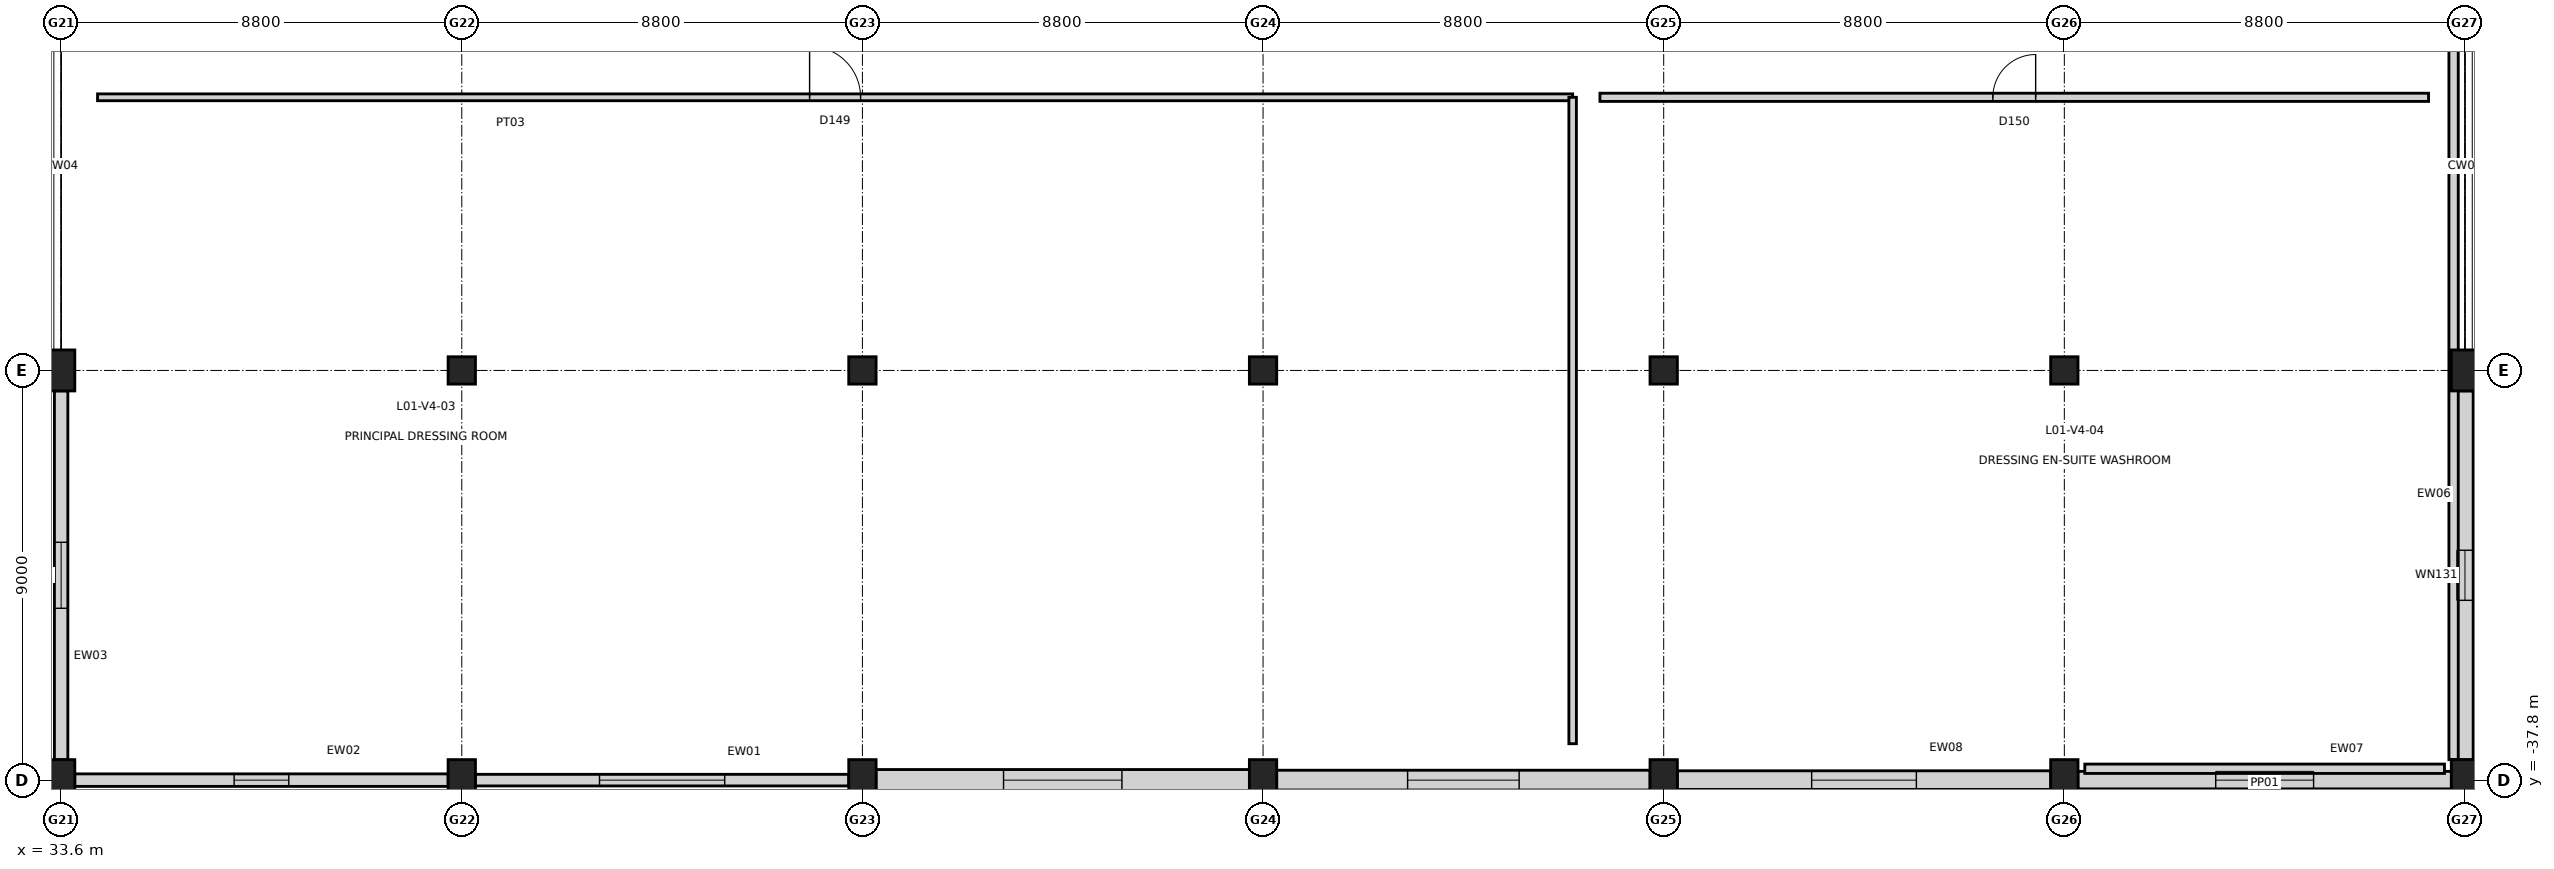
"""IFC4 building model, lengths in metres.
Left out: names, types, materials, properties, quantities, classifications, styles, units other than length and angle.
Written with IfcOpenShell. Run it as: python <this file> out.ifc"""

import sys

from ifc_helpers import new_model, si_unit, direction, frame, frame_2d, origin, origin_2d, place, context, subcontext, project, spatial, rectangle, extrude, element, fill, save


model = new_model("IFC4")
c1 = context("Model", 3, precision=1e-05, world=origin(), true_north=direction((0.0, 1.0)))
c2 = subcontext(c1, "Body", "Model", "MODEL_VIEW")
j1 = project(units=[si_unit("LENGTHUNIT", "METRE"), si_unit("PLANEANGLEUNIT", "RADIAN")], contexts=[c1])
p1 = place(None, origin())
s1 = spatial("IfcSite", under=j1, at=p1, CompositionType="ELEMENT")
p2 = place(p1, origin())
s2 = spatial("IfcBuilding", under=s1, at=p2, CompositionType="ELEMENT")
p3 = place(p2, frame((0.0, 0.0, 5.4)))
s3 = spatial("IfcBuildingStorey", under=s2, at=p3, CompositionType="ELEMENT", Elevation=5.4)
for number, where, z_axis, x_axis in (
    (1, (33.6, -37.8, 0.0), (0.0, 0.0, 1.0), (1.0, 0.0, 0.0)),
    (2, (33.6, -28.8, 0.0), (0.0, 0.0, 1.0), (1.0, 0.0, 0.0)),
    (3, (42.4, -37.8, 0.0), (0.0, 0.0, 1.0), (1.0, 0.0, 0.0)),
):
    element("IfcColumn", number, at=place(p3, frame(where, z_axis=z_axis, x_axis=x_axis)), inside=s3, PredefinedType="COLUMN", context=c2, shape_type="SweptSolid", body=[
        extrude(rectangle(XDim=0.6, YDim=0.9, at=origin_2d()), origin(), (0.0, 0.0, 1.0), 4.8),
    ])
p4 = place(p3, frame((42.4, -28.8, 0.0), z_axis=(0.0, 0.0, 1.0), x_axis=(1.0, 0.0, 0.0)))
e4 = element("IfcColumn", 4, at=p4, inside=s3, PredefinedType="COLUMN", context=c2, shape_type="SweptSolid", body=[
    extrude(rectangle(XDim=0.6, YDim=0.6, at=origin_2d()), origin(), (0.0, 0.0, 1.0), 4.8),
])
p5 = place(p3, frame((51.2, -37.8, 0.0), z_axis=(0.0, 0.0, 1.0), x_axis=(1.0, 0.0, 0.0)))
e5 = element("IfcColumn", 5, at=p5, inside=s3, PredefinedType="COLUMN", context=c2, shape_type="SweptSolid", body=[
    extrude(rectangle(XDim=0.6, YDim=0.9, at=origin_2d()), origin(), (0.0, 0.0, 1.0), 4.8),
])
p6 = place(p3, frame((51.2, -28.8, 0.0), z_axis=(0.0, 0.0, 1.0), x_axis=(1.0, 0.0, 0.0)))
e6 = element("IfcColumn", 6, at=p6, inside=s3, PredefinedType="COLUMN", context=c2, shape_type="SweptSolid", body=[
    extrude(rectangle(XDim=0.6, YDim=0.6, at=origin_2d()), origin(), (0.0, 0.0, 1.0), 4.8),
])
p7 = place(p3, frame((60.0, -37.8, 0.0), z_axis=(0.0, 0.0, 1.0), x_axis=(1.0, 0.0, 0.0)))
e7 = element("IfcColumn", 7, at=p7, inside=s3, PredefinedType="COLUMN", context=c2, shape_type="SweptSolid", body=[
    extrude(rectangle(XDim=0.6, YDim=0.9, at=origin_2d()), origin(), (0.0, 0.0, 1.0), 4.8),
])
p8 = place(p3, frame((60.0, -28.8, 0.0), z_axis=(0.0, 0.0, 1.0), x_axis=(1.0, 0.0, 0.0)))
e8 = element("IfcColumn", 8, at=p8, inside=s3, PredefinedType="COLUMN", context=c2, shape_type="SweptSolid", body=[
    extrude(rectangle(XDim=0.6, YDim=0.6, at=origin_2d()), origin(), (0.0, 0.0, 1.0), 4.8),
])
p9 = place(p3, frame((68.8, -37.8, 0.0), z_axis=(0.0, 0.0, 1.0), x_axis=(1.0, 0.0, 0.0)))
e9 = element("IfcColumn", 9, at=p9, inside=s3, PredefinedType="COLUMN", context=c2, shape_type="SweptSolid", body=[
    extrude(rectangle(XDim=0.6, YDim=0.9, at=origin_2d()), origin(), (0.0, 0.0, 1.0), 4.8),
])
p10 = place(p3, frame((68.8, -28.8, 0.0), z_axis=(0.0, 0.0, 1.0), x_axis=(1.0, 0.0, 0.0)))
e10 = element("IfcColumn", 10, at=p10, inside=s3, PredefinedType="COLUMN", context=c2, shape_type="SweptSolid", body=[
    extrude(rectangle(XDim=0.6, YDim=0.6, at=origin_2d()), origin(), (0.0, 0.0, 1.0), 4.8),
])
p11 = place(p3, frame((77.6, -37.8, 0.0), z_axis=(0.0, 0.0, 1.0), x_axis=(1.0, 0.0, 0.0)))
e11 = element("IfcColumn", 11, at=p11, inside=s3, PredefinedType="COLUMN", context=c2, shape_type="SweptSolid", body=[
    extrude(rectangle(XDim=0.6, YDim=0.9, at=origin_2d()), origin(), (0.0, 0.0, 1.0), 4.8),
])
p12 = place(p3, frame((77.6, -28.8, 0.0), z_axis=(0.0, 0.0, 1.0), x_axis=(1.0, 0.0, 0.0)))
e12 = element("IfcColumn", 12, at=p12, inside=s3, PredefinedType="COLUMN", context=c2, shape_type="SweptSolid", body=[
    extrude(rectangle(XDim=0.6, YDim=0.6, at=origin_2d()), origin(), (0.0, 0.0, 1.0), 4.8),
])
for number, where, z_axis, x_axis in (
    (13, (86.4, -37.8, 0.0), (0.0, 0.0, 1.0), (1.0, 0.0, 0.0)),
    (14, (86.4, -28.8, 0.0), (0.0, 0.0, 1.0), (1.0, 0.0, 0.0)),
):
    element("IfcColumn", number, at=place(p3, frame(where, z_axis=z_axis, x_axis=x_axis)), inside=s3, PredefinedType="COLUMN", context=c2, shape_type="SweptSolid", body=[
        extrude(rectangle(XDim=0.6, YDim=0.9, at=origin_2d()), origin(), (0.0, 0.0, 1.0), 4.8),
    ])
p13 = place(p3, frame((86.102, -37.8, 0.0), z_axis=(0.0, 0.0, 1.0), x_axis=(-1.0, 0.0, 0.0)))
e15 = element("IfcWall", 15, at=p13, inside=s3, PredefinedType="STANDARD", context=c2, shape_type="SweptSolid", body=[
    extrude(rectangle(XDim=8.204, YDim=0.385, at=frame_2d((4.102, 0.0))), origin(), (0.0, 0.0, 1.0), 3.745),
])
p14 = place(p13, frame((3.027, 0.0, 0.85)))
e16 = element("IfcOpeningElement", 16, at=p14, cuts=e15, PredefinedType="OPENING", context=c2, shape_type="SweptSolid", body=[
    extrude(rectangle(XDim=2.15, YDim=1.85, at=frame_2d((1.075, 0.925))), frame((0.0, 0.202, 0.0), z_axis=(0.0, -1.0, 0.0), x_axis=(1.0, 0.0, 0.0)), (0.0, 0.0, 1.0), 0.405),
])
p15 = place(p3, frame((77.302, -37.8, 0.0), z_axis=(0.0, 0.0, 1.0), x_axis=(-1.0, 0.0, 0.0)))
e17 = element("IfcWall", 17, at=p15, inside=s3, PredefinedType="STANDARD", context=c2, shape_type="SweptSolid", body=[
    extrude(rectangle(XDim=8.204, YDim=0.41, at=frame_2d((4.102, 0.0))), origin(), (0.0, 0.0, 1.0), 3.745),
])
p16 = place(p15, frame((2.952, 0.0, 0.85)))
e18 = element("IfcOpeningElement", 18, at=p16, cuts=e17, PredefinedType="OPENING", context=c2, shape_type="SweptSolid", body=[
    extrude(rectangle(XDim=2.3, YDim=1.85, at=frame_2d((1.15, 0.925))), frame((0.0, 0.215, 0.0), z_axis=(0.0, -1.0, 0.0), x_axis=(1.0, 0.0, 0.0)), (0.0, 0.0, 1.0), 0.43),
])
p17 = place(p3, frame((68.502, -37.8, 0.0), z_axis=(0.0, 0.0, 1.0), x_axis=(-1.0, 0.0, 0.0)))
e19 = element("IfcWall", 19, at=p17, inside=s3, PredefinedType="STANDARD", context=c2, shape_type="SweptSolid", body=[
    extrude(rectangle(XDim=8.204, YDim=0.435, at=frame_2d((4.102, 0.0))), origin(), (0.0, 0.0, 1.0), 3.745),
])
p18 = place(p17, frame((2.877, 0.0, 0.85)))
e20 = element("IfcOpeningElement", 20, at=p18, cuts=e19, PredefinedType="OPENING", context=c2, shape_type="SweptSolid", body=[
    extrude(rectangle(XDim=2.45, YDim=1.95, at=frame_2d((1.225, 0.975))), frame((0.0, 0.228, 0.0), z_axis=(0.0, -1.0, 0.0), x_axis=(1.0, 0.0, 0.0)), (0.0, 0.0, 1.0), 0.455),
])
p19 = place(p3, frame((59.702, -37.8, 0.0), z_axis=(0.0, 0.0, 1.0), x_axis=(-1.0, 0.0, 0.0)))
e21 = element("IfcWall", 21, at=p19, inside=s3, PredefinedType="STANDARD", context=c2, shape_type="SweptSolid", body=[
    extrude(rectangle(XDim=8.204, YDim=0.465, at=frame_2d((4.102, 0.0))), origin(), (0.0, 0.0, 1.0), 3.745),
])
p20 = place(p19, frame((2.802, 0.0, 0.85)))
e22 = element("IfcOpeningElement", 22, at=p20, cuts=e21, PredefinedType="OPENING", context=c2, shape_type="SweptSolid", body=[
    extrude(rectangle(XDim=2.6, YDim=1.95, at=frame_2d((1.3, 0.975))), frame((0.0, 0.242, 0.0), z_axis=(0.0, -1.0, 0.0), x_axis=(1.0, 0.0, 0.0)), (0.0, 0.0, 1.0), 0.485),
])
p21 = place(p3, frame((50.902, -37.8, 0.0), z_axis=(0.0, 0.0, 1.0), x_axis=(-1.0, 0.0, 0.0)))
e23 = element("IfcWall", 23, at=p21, inside=s3, PredefinedType="STANDARD", context=c2, shape_type="SweptSolid", body=[
    extrude(rectangle(XDim=8.204, YDim=0.255, at=frame_2d((4.102, 0.0))), origin(), (0.0, 0.0, 1.0), 3.745),
])
p22 = place(p21, frame((2.727, 0.0, 0.85)))
e24 = element("IfcOpeningElement", 24, at=p22, cuts=e23, PredefinedType="OPENING", context=c2, shape_type="SweptSolid", body=[
    extrude(rectangle(XDim=2.75, YDim=1.95, at=frame_2d((1.375, 0.975))), frame((0.0, 0.137, 0.0), z_axis=(0.0, -1.0, 0.0), x_axis=(1.0, 0.0, 0.0)), (0.0, 0.0, 1.0), 0.275),
])
p23 = place(p3, frame((42.102, -37.8, 0.0), z_axis=(0.0, 0.0, 1.0), x_axis=(-1.0, 0.0, 0.0)))
e25 = element("IfcWall", 25, at=p23, inside=s3, PredefinedType="STANDARD", context=c2, shape_type="SweptSolid", body=[
    extrude(rectangle(XDim=8.204, YDim=0.275, at=frame_2d((4.102, 0.0))), origin(), (0.0, 0.0, 1.0), 3.745),
])
p24 = place(p23, frame((3.502, 0.0, 0.85)))
e26 = element("IfcOpeningElement", 26, at=p24, cuts=e25, PredefinedType="OPENING", context=c2, shape_type="SweptSolid", body=[
    extrude(rectangle(XDim=1.2, YDim=2.1, at=frame_2d((0.6, 1.05))), frame((0.0, 0.147, 0.0), z_axis=(0.0, -1.0, 0.0), x_axis=(1.0, 0.0, 0.0)), (0.0, 0.0, 1.0), 0.295),
])
p25 = place(p3, frame((33.6, -37.352, 0.0), z_axis=(0.0, 0.0, 1.0), x_axis=(0.0, 1.0, 0.0)))
e27 = element("IfcWall", 27, at=p25, inside=s3, PredefinedType="STANDARD", context=c2, shape_type="SweptSolid", body=[
    extrude(rectangle(XDim=8.104, YDim=0.295, at=frame_2d((4.052, 0.0))), origin(), (0.0, 0.0, 1.0), 3.829),
])
p26 = place(p25, frame((3.327, 0.0, 0.85)))
e28 = element("IfcOpeningElement", 28, at=p26, cuts=e27, PredefinedType="OPENING", context=c2, shape_type="SweptSolid", body=[
    extrude(rectangle(XDim=1.45, YDim=2.1, at=frame_2d((0.725, 1.05))), frame((0.0, 0.157, 0.0), z_axis=(0.0, -1.0, 0.0), x_axis=(1.0, 0.0, 0.0)), (0.0, 0.0, 1.0), 0.315),
])
p27 = place(p3, frame((86.4, -29.248, 0.0), z_axis=(0.0, 0.0, 1.0), x_axis=(0.0, -1.0, 0.0)))
e29 = element("IfcWall", 29, at=p27, inside=s3, PredefinedType="STANDARD", context=c2, shape_type="SweptSolid", body=[
    extrude(rectangle(XDim=8.104, YDim=0.36, at=frame_2d((4.052, 0.0))), origin(), (0.0, 0.0, 1.0), 3.829),
])
p28 = place(p27, frame((3.502, 0.0, 0.85)))
e30 = element("IfcOpeningElement", 30, at=p28, cuts=e29, PredefinedType="OPENING", context=c2, shape_type="SweptSolid", body=[
    extrude(rectangle(XDim=1.1, YDim=1.6, at=frame_2d((0.55, 0.8))), frame((0.0, 0.19, 0.0), z_axis=(0.0, -1.0, 0.0), x_axis=(1.0, 0.0, 0.0)), (0.0, 0.0, 1.0), 0.38),
])
p29 = place(p3, frame((78.05, -37.55, 4.8), z_axis=(0.0, 0.0, 1.0), x_axis=(1.0, 0.0, 0.0)))
e31 = element("IfcWall", 31, at=p29, inside=s3, PredefinedType="PARAPET", context=c2, shape_type="SweptSolid", body=[
    extrude(rectangle(XDim=7.9, YDim=0.205, at=frame_2d((3.95, 0.0))), origin(), (0.0, 0.0, 1.0), 1.15),
])
p30 = place(p3, frame((86.15, -37.35, 4.8), z_axis=(0.0, 0.0, 1.0), x_axis=(0.0, 1.0, 0.0)))
e32 = element("IfcWall", 32, at=p30, inside=s3, PredefinedType="PARAPET", context=c2, shape_type="SweptSolid", body=[
    extrude(rectangle(XDim=70.5, YDim=0.205, at=frame_2d((35.25, 0.0))), origin(), (0.0, 0.0, 1.0), 1.15),
])
p31 = place(p3, frame((34.4, -22.8, 0.0), z_axis=(0.0, 0.0, 1.0), x_axis=(1.0, 0.0, 0.0)))
e33 = element("IfcWall", 33, at=p31, inside=s3, PredefinedType="PARTITIONING", context=c2, shape_type="SweptSolid", body=[
    extrude(rectangle(XDim=32.4, YDim=0.15, at=frame_2d((16.2, 0.0))), origin(), (0.0, 0.0, 1.0), 4.42),
])
p32 = place(p31, frame((15.64, 0.0, 0.0)))
e34 = element("IfcOpeningElement", 34, at=p32, cuts=e33, PredefinedType="OPENING", context=c2, shape_type="SweptSolid", body=[
    extrude(rectangle(XDim=1.12, YDim=2.25, at=frame_2d((0.56, 1.125))), frame((0.0, 0.085, 0.0), z_axis=(0.0, -1.0, 0.0), x_axis=(1.0, 0.0, 0.0)), (0.0, 0.0, 1.0), 0.17),
])
p33 = place(p3, frame((66.8, -37.0, 0.0), z_axis=(0.0, 0.0, 1.0), x_axis=(0.0, 1.0, 0.0)))
e35 = element("IfcWall", 35, at=p33, inside=s3, PredefinedType="PARTITIONING", context=c2, shape_type="SweptSolid", body=[
    extrude(rectangle(XDim=14.2, YDim=0.165, at=frame_2d((7.1, 0.0))), origin(), (0.0, 0.0, 1.0), 4.42),
])
p34 = place(p3, frame((67.4, -22.8, 0.0), z_axis=(0.0, 0.0, 1.0), x_axis=(1.0, 0.0, 0.0)))
e36 = element("IfcWall", 36, at=p34, inside=s3, PredefinedType="PARTITIONING", context=c2, shape_type="SweptSolid", body=[
    extrude(rectangle(XDim=18.2, YDim=0.18, at=frame_2d((9.1, 0.0))), origin(), (0.0, 0.0, 1.0), 4.42),
])
p35 = place(p34, frame((8.63, 0.0, 0.0)))
e37 = element("IfcOpeningElement", 37, at=p35, cuts=e36, PredefinedType="OPENING", context=c2, shape_type="SweptSolid", body=[
    extrude(rectangle(XDim=0.94, YDim=2.1, at=frame_2d((0.47, 1.05))), frame((0.0, 0.1, 0.0), z_axis=(0.0, -1.0, 0.0), x_axis=(1.0, 0.0, 0.0)), (0.0, 0.0, 1.0), 0.2),
])
p36 = place(p14, origin())
e38 = element("IfcWindow", 38, at=p36, inside=s3, PartitioningType="SINGLE_PANEL", PredefinedType="WINDOW", context=c2, shape_type="SweptSolid", body=[
    extrude(rectangle(XDim=2.15, YDim=1.85, at=frame_2d((1.075, 0.925))), frame((0.0, 0.03, 0.0), z_axis=(0.0, -1.0, 0.0), x_axis=(1.0, 0.0, 0.0)), (0.0, 0.0, 1.0), 0.06),
])
fill(e16, e38)
p37 = place(p16, origin())
e39 = element("IfcWindow", 39, at=p37, inside=s3, PartitioningType="SINGLE_PANEL", PredefinedType="WINDOW", context=c2, shape_type="SweptSolid", body=[
    extrude(rectangle(XDim=2.3, YDim=1.85, at=frame_2d((1.15, 0.925))), frame((0.0, 0.03, 0.0), z_axis=(0.0, -1.0, 0.0), x_axis=(1.0, 0.0, 0.0)), (0.0, 0.0, 1.0), 0.06),
])
fill(e18, e39)
p38 = place(p18, origin())
e40 = element("IfcWindow", 40, at=p38, inside=s3, PartitioningType="SINGLE_PANEL", PredefinedType="WINDOW", context=c2, shape_type="SweptSolid", body=[
    extrude(rectangle(XDim=2.45, YDim=1.95, at=frame_2d((1.225, 0.975))), frame((0.0, 0.03, 0.0), z_axis=(0.0, -1.0, 0.0), x_axis=(1.0, 0.0, 0.0)), (0.0, 0.0, 1.0), 0.06),
])
fill(e20, e40)
p39 = place(p20, origin())
e41 = element("IfcWindow", 41, at=p39, inside=s3, PartitioningType="SINGLE_PANEL", PredefinedType="WINDOW", context=c2, shape_type="SweptSolid", body=[
    extrude(rectangle(XDim=2.6, YDim=1.95, at=frame_2d((1.3, 0.975))), frame((0.0, 0.03, 0.0), z_axis=(0.0, -1.0, 0.0), x_axis=(1.0, 0.0, 0.0)), (0.0, 0.0, 1.0), 0.06),
])
fill(e22, e41)
p40 = place(p22, origin())
e42 = element("IfcWindow", 42, at=p40, inside=s3, PartitioningType="SINGLE_PANEL", PredefinedType="WINDOW", context=c2, shape_type="SweptSolid", body=[
    extrude(rectangle(XDim=2.75, YDim=1.95, at=frame_2d((1.375, 0.975))), frame((0.0, 0.03, 0.0), z_axis=(0.0, -1.0, 0.0), x_axis=(1.0, 0.0, 0.0)), (0.0, 0.0, 1.0), 0.06),
])
fill(e24, e42)
p41 = place(p24, origin())
e43 = element("IfcWindow", 43, at=p41, inside=s3, PartitioningType="SINGLE_PANEL", PredefinedType="WINDOW", context=c2, shape_type="SweptSolid", body=[
    extrude(rectangle(XDim=1.2, YDim=2.1, at=frame_2d((0.6, 1.05))), frame((0.0, 0.03, 0.0), z_axis=(0.0, -1.0, 0.0), x_axis=(1.0, 0.0, 0.0)), (0.0, 0.0, 1.0), 0.06),
])
fill(e26, e43)
p42 = place(p26, origin())
e44 = element("IfcWindow", 44, at=p42, inside=s3, PartitioningType="SINGLE_PANEL", PredefinedType="WINDOW", context=c2, shape_type="SweptSolid", body=[
    extrude(rectangle(XDim=1.45, YDim=2.1, at=frame_2d((0.725, 1.05))), frame((0.0, 0.03, 0.0), z_axis=(0.0, -1.0, 0.0), x_axis=(1.0, 0.0, 0.0)), (0.0, 0.0, 1.0), 0.06),
])
fill(e28, e44)
p43 = place(p28, origin())
e45 = element("IfcWindow", 45, at=p43, inside=s3, PartitioningType="SINGLE_PANEL", PredefinedType="WINDOW", context=c2, shape_type="SweptSolid", body=[
    extrude(rectangle(XDim=1.1, YDim=1.6, at=frame_2d((0.55, 0.8))), frame((0.0, 0.03, 0.0), z_axis=(0.0, -1.0, 0.0), x_axis=(1.0, 0.0, 0.0)), (0.0, 0.0, 1.0), 0.06),
])
fill(e30, e45)
p44 = place(p32, origin())
e46 = element("IfcDoor", 46, at=p44, inside=s3, OperationType="SINGLE_SWING_LEFT", PredefinedType="DOOR", context=c2, shape_type="SweptSolid", body=[
    extrude(rectangle(XDim=1.12, YDim=2.25, at=frame_2d((0.56, 1.125))), frame((0.0, 0.025, 0.0), z_axis=(0.0, -1.0, 0.0), x_axis=(1.0, 0.0, 0.0)), (0.0, 0.0, 1.0), 0.05),
])
fill(e34, e46)
p45 = place(p35, origin())
e47 = element("IfcDoor", 47, at=p45, inside=s3, OperationType="SINGLE_SWING_RIGHT", PredefinedType="DOOR", context=c2, shape_type="SweptSolid", body=[
    extrude(rectangle(XDim=0.94, YDim=2.1, at=frame_2d((0.47, 1.05))), frame((0.0, 0.025, 0.0), z_axis=(0.0, -1.0, 0.0), x_axis=(1.0, 0.0, 0.0)), (0.0, 0.0, 1.0), 0.05),
])
fill(e37, e47)
save(model, sys.argv[1])
